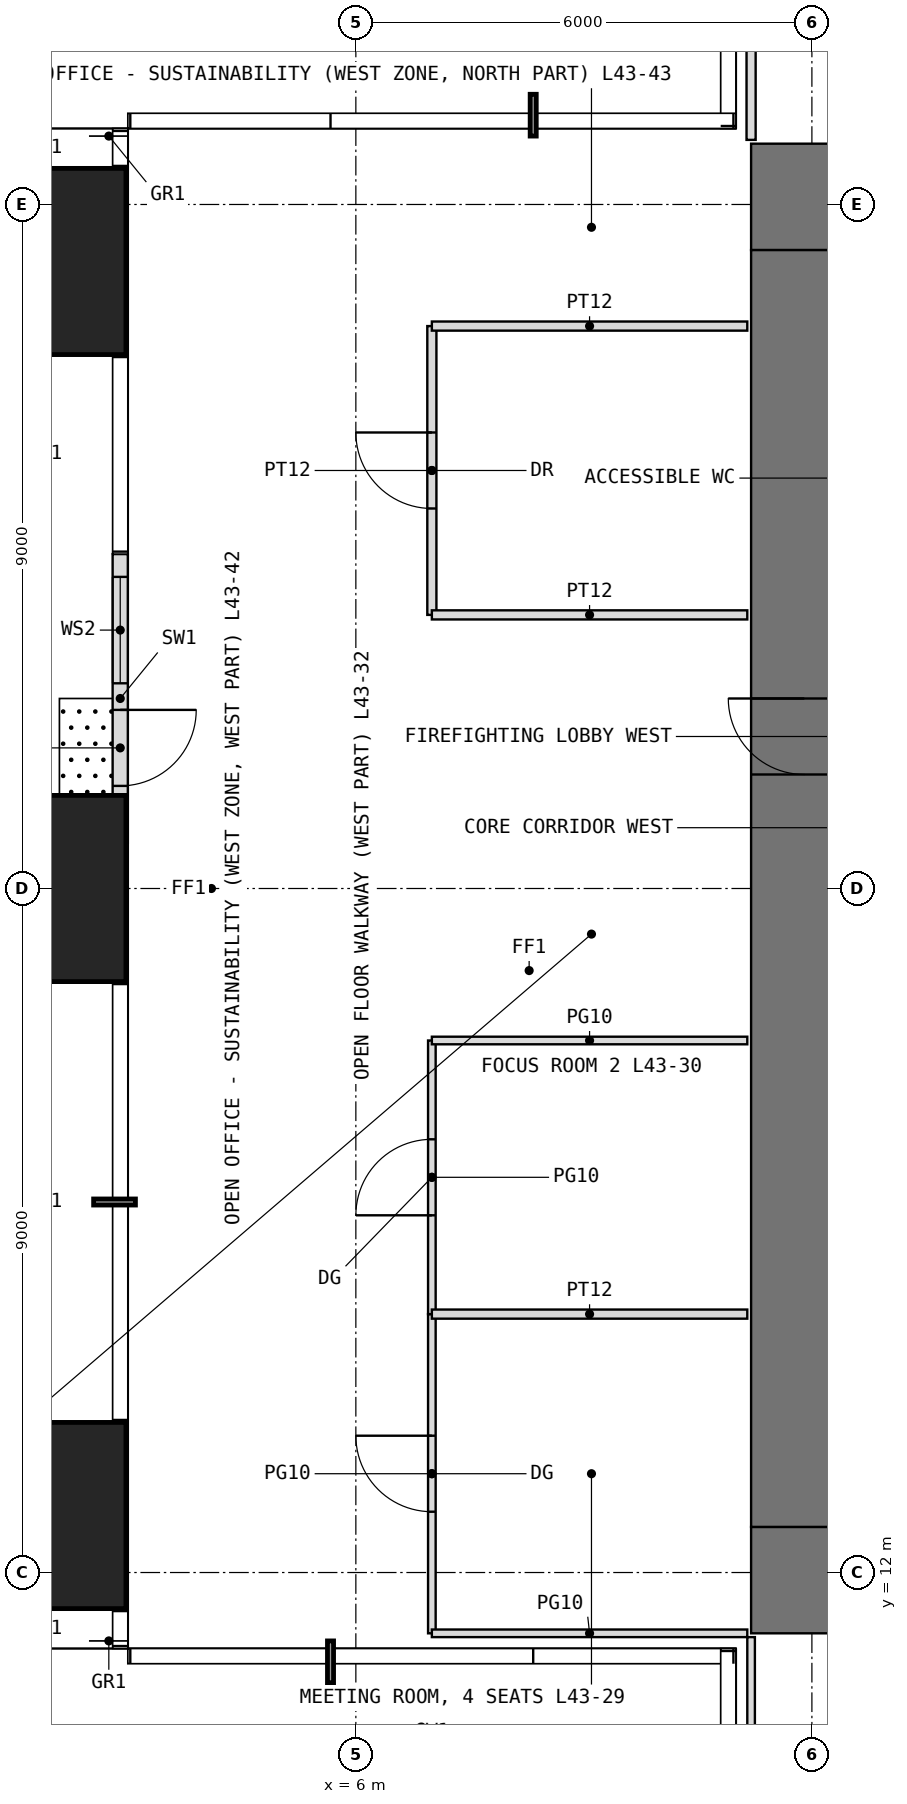
"""IFC4 building model, lengths in metres.
Left out: names, types, materials, properties, quantities, classifications, styles, units other than length and angle.
Written with IfcOpenShell. Run it as: python <this file> out.ifc"""

import sys

from ifc_helpers import new_model, si_unit, direction, frame, frame_2d, origin, origin_2d, place, context, subcontext, project, spatial, rectangle, extrude, element, fill, save


model = new_model("IFC4")
c1 = context("Model", 3, precision=1e-05, world=origin(), true_north=direction((0.0, 1.0)))
c2 = subcontext(c1, "Body", "Model", "MODEL_VIEW")
j1 = project(units=[si_unit("LENGTHUNIT", "METRE"), si_unit("PLANEANGLEUNIT", "RADIAN")], contexts=[c1])
p1 = place(None, origin())
s1 = spatial("IfcSite", under=j1, at=p1, CompositionType="ELEMENT")
p2 = place(p1, origin())
s2 = spatial("IfcBuilding", under=s1, at=p2, CompositionType="ELEMENT")
p3 = place(p2, frame((0.0, 0.0, 182.5)))
s3 = spatial("IfcBuildingStorey", under=s2, at=p3, CompositionType="ELEMENT", Elevation=182.5)
for number, where, z_axis, x_axis in (
    (1, (1.75, 12.75, 0.0), (0.0, 0.0, 1.0), (1.0, 0.0, 0.0)),
    (2, (1.75, 21.0, 0.0), (0.0, 0.0, 1.0), (1.0, 0.0, 0.0)),
    (3, (1.75, 29.25, 0.0), (0.0, 0.0, 1.0), (1.0, 0.0, 0.0)),
):
    element("IfcColumn", number, at=place(p3, frame(where, z_axis=z_axis, x_axis=x_axis)), inside=s3, PredefinedType="COLUMN", context=c2, shape_type="SweptSolid", body=[
        extrude(rectangle(XDim=2.45, YDim=2.45, at=origin_2d()), origin(), (0.0, 0.0, 1.0), 4.0),
    ])
p4 = place(p3, frame((2.9, 25.4, 0.0), z_axis=(0.0, 0.0, 1.0), x_axis=(0.0, -1.0, 0.0)))
e4 = element("IfcWall", 4, at=p4, inside=s3, PredefinedType="USERDEFINED", context=c2, shape_type="SweptSolid", body=[
    extrude(rectangle(XDim=3.8, YDim=0.2, at=frame_2d((1.9, 0.0))), origin(), (0.0, 0.0, 1.0), 3.75),
])
p5 = place(p4, frame((2.05, 0.0, 0.0)))
e5 = element("IfcOpeningElement", 5, at=p5, cuts=e4, PredefinedType="OPENING", context=c2, shape_type="SweptSolid", body=[
    extrude(rectangle(XDim=1.0, YDim=2.4, at=frame_2d((0.5, 1.2))), frame((0.0, 0.11, 0.0), z_axis=(0.0, -1.0, 0.0), x_axis=(1.0, 0.0, 0.0)), (0.0, 0.0, 1.0), 0.22),
])
p6 = place(p4, frame((0.3, 0.0, 0.3)))
e6 = element("IfcOpeningElement", 6, at=p6, cuts=e4, PredefinedType="OPENING", context=c2, shape_type="SweptSolid", body=[
    extrude(rectangle(XDim=1.4, YDim=2.7, at=frame_2d((0.7, 1.35))), frame((0.0, 0.11, 0.0), z_axis=(0.0, -1.0, 0.0), x_axis=(1.0, 0.0, 0.0)), (0.0, 0.0, 1.0), 0.22),
])
p7 = place(p3, frame((11.2, 11.9, -0.05), z_axis=(0.0, 0.0, 1.0), x_axis=(1.0, 0.0, 0.0)))
e7 = element("IfcWall", 7, at=p7, inside=s3, PredefinedType="SHEAR", context=c2, shape_type="SweptSolid", body=[
    extrude(rectangle(XDim=19.6, YDim=1.4, at=frame_2d((9.8, 0.0))), origin(), (0.0, 0.0, 1.0), 4.0),
])
p8 = place(p7, frame((8.8, 0.0, 0.05)))
e8 = element("IfcOpeningElement", 8, at=p8, cuts=e7, PredefinedType="OPENING", context=c2, shape_type="SweptSolid", body=[
    extrude(rectangle(XDim=2.0, YDim=2.2, at=frame_2d((1.0, 1.1))), frame((0.0, 0.71, 0.0), z_axis=(0.0, -1.0, 0.0), x_axis=(1.0, 0.0, 0.0)), (0.0, 0.0, 1.0), 1.42),
])
p9 = place(p3, frame((11.2, 30.1, -0.05), z_axis=(0.0, 0.0, 1.0), x_axis=(1.0, 0.0, 0.0)))
e9 = element("IfcWall", 9, at=p9, inside=s3, PredefinedType="SHEAR", context=c2, shape_type="SweptSolid", body=[
    extrude(rectangle(XDim=19.6, YDim=1.4, at=frame_2d((9.8, 0.0))), origin(), (0.0, 0.0, 1.0), 4.0),
])
p10 = place(p9, frame((8.8, 0.0, 0.05)))
e10 = element("IfcOpeningElement", 10, at=p10, cuts=e9, PredefinedType="OPENING", context=c2, shape_type="SweptSolid", body=[
    extrude(rectangle(XDim=2.0, YDim=2.2, at=frame_2d((1.0, 1.1))), frame((0.0, 0.71, 0.0), z_axis=(0.0, -1.0, 0.0), x_axis=(1.0, 0.0, 0.0)), (0.0, 0.0, 1.0), 1.42),
])
p11 = place(p3, frame((11.9, 12.6, -0.05), z_axis=(0.0, 0.0, 1.0), x_axis=(0.0, 1.0, 0.0)))
e11 = element("IfcWall", 11, at=p11, inside=s3, PredefinedType="SHEAR", context=c2, shape_type="SweptSolid", body=[
    extrude(rectangle(XDim=16.8, YDim=1.4, at=frame_2d((8.4, 0.0))), origin(), (0.0, 0.0, 1.0), 4.0),
])
p12 = place(p11, frame((9.9, 0.0, 0.05)))
e12 = element("IfcOpeningElement", 12, at=p12, cuts=e11, PredefinedType="OPENING", context=c2, shape_type="SweptSolid", body=[
    extrude(rectangle(XDim=1.0, YDim=2.2, at=frame_2d((0.5, 1.1))), frame((0.0, 0.71, 0.0), z_axis=(0.0, -1.0, 0.0), x_axis=(1.0, 0.0, 0.0)), (0.0, 0.0, 1.0), 1.42),
])
p13 = place(p3, frame((7.0, 11.2, 0.0), z_axis=(0.0, 0.0, 1.0), x_axis=(0.0, 1.0, 0.0)))
e13 = element("IfcWall", 13, at=p13, inside=s3, PredefinedType="PARTITIONING", context=c2, shape_type="SweptSolid", body=[
    extrude(rectangle(XDim=4.2, YDim=0.1, at=frame_2d((2.1, 0.0))), origin(), (0.0, 0.0, 1.0), 3.75),
])
p14 = place(p13, frame((1.6, 0.0, 0.0)))
e14 = element("IfcOpeningElement", 14, at=p14, cuts=e13, PredefinedType="OPENING", context=c2, shape_type="SweptSolid", body=[
    extrude(rectangle(XDim=1.0, YDim=2.4, at=frame_2d((0.5, 1.2))), frame((0.0, 0.06, 0.0), z_axis=(0.0, -1.0, 0.0), x_axis=(1.0, 0.0, 0.0)), (0.0, 0.0, 1.0), 0.12),
])
p15 = place(p3, frame((7.0, 11.2, 0.0), z_axis=(0.0, 0.0, 1.0), x_axis=(1.0, 0.0, 0.0)))
e15 = element("IfcWall", 15, at=p15, inside=s3, PredefinedType="PARTITIONING", context=c2, shape_type="SweptSolid", body=[
    extrude(rectangle(XDim=4.15, YDim=0.1, at=frame_2d((2.075, 0.0))), origin(), (0.0, 0.0, 1.0), 3.75),
])
p16 = place(p3, frame((7.0, 15.4, 0.0), z_axis=(0.0, 0.0, 1.0), x_axis=(0.0, 1.0, 0.0)))
e16 = element("IfcWall", 16, at=p16, inside=s3, PredefinedType="PARTITIONING", context=c2, shape_type="SweptSolid", body=[
    extrude(rectangle(XDim=3.6, YDim=0.1, at=frame_2d((1.8, 0.0))), origin(), (0.0, 0.0, 1.0), 3.75),
])
p17 = place(p16, frame((1.3, 0.0, 0.0)))
e17 = element("IfcOpeningElement", 17, at=p17, cuts=e16, PredefinedType="OPENING", context=c2, shape_type="SweptSolid", body=[
    extrude(rectangle(XDim=1.0, YDim=2.4, at=frame_2d((0.5, 1.2))), frame((0.0, 0.06, 0.0), z_axis=(0.0, -1.0, 0.0), x_axis=(1.0, 0.0, 0.0)), (0.0, 0.0, 1.0), 0.12),
])
p18 = place(p3, frame((7.0, 15.4, 0.0), z_axis=(0.0, 0.0, 1.0), x_axis=(1.0, 0.0, 0.0)))
e18 = element("IfcWall", 18, at=p18, inside=s3, PredefinedType="PARTITIONING", context=c2, shape_type="SweptSolid", body=[
    extrude(rectangle(XDim=4.15, YDim=0.12, at=frame_2d((2.075, 0.0))), origin(), (0.0, 0.0, 1.0), 3.75),
])
p19 = place(p3, frame((7.0, 19.0, 0.0), z_axis=(0.0, 0.0, 1.0), x_axis=(1.0, 0.0, 0.0)))
e19 = element("IfcWall", 19, at=p19, inside=s3, PredefinedType="PARTITIONING", context=c2, shape_type="SweptSolid", body=[
    extrude(rectangle(XDim=4.15, YDim=0.1, at=frame_2d((2.075, 0.0))), origin(), (0.0, 0.0, 1.0), 3.75),
])
p20 = place(p3, frame((7.0, 24.6, 0.0), z_axis=(0.0, 0.0, 1.0), x_axis=(0.0, 1.0, 0.0)))
e20 = element("IfcWall", 20, at=p20, inside=s3, PredefinedType="PARTITIONING", context=c2, shape_type="SweptSolid", body=[
    extrude(rectangle(XDim=3.8, YDim=0.12, at=frame_2d((1.9, 0.0))), origin(), (0.0, 0.0, 1.0), 3.75),
])
p21 = place(p20, frame((1.4, 0.0, 0.0)))
e21 = element("IfcOpeningElement", 21, at=p21, cuts=e20, PredefinedType="OPENING", context=c2, shape_type="SweptSolid", body=[
    extrude(rectangle(XDim=1.0, YDim=2.2, at=frame_2d((0.5, 1.1))), frame((0.0, 0.07, 0.0), z_axis=(0.0, -1.0, 0.0), x_axis=(1.0, 0.0, 0.0)), (0.0, 0.0, 1.0), 0.14),
])
for number, where, z_axis, x_axis in (
    (22, (7.0, 24.6, 0.0), (0.0, 0.0, 1.0), (1.0, 0.0, 0.0)),
    (23, (7.0, 28.4, 0.0), (0.0, 0.0, 1.0), (1.0, 0.0, 0.0)),
):
    element("IfcWall", number, at=place(p3, frame(where, z_axis=z_axis, x_axis=x_axis)), inside=s3, PredefinedType="PARTITIONING", context=c2, shape_type="SweptSolid", body=[
        extrude(rectangle(XDim=4.15, YDim=0.12, at=frame_2d((2.075, 0.0))), origin(), (0.0, 0.0, 1.0), 3.75),
    ])
p22 = place(p3, frame((11.2, 6.2, 0.0), z_axis=(0.0, 0.0, 1.0), x_axis=(0.0, 1.0, 0.0)))
e24 = element("IfcWall", 24, at=p22, inside=s3, PredefinedType="PARTITIONING", context=c2, shape_type="SweptSolid", body=[
    extrude(rectangle(XDim=4.95, YDim=0.1, at=frame_2d((2.475, 0.0))), origin(), (0.0, 0.0, 1.0), 3.75),
])
p23 = place(p3, frame((11.2, 30.85, 0.0), z_axis=(0.0, 0.0, 1.0), x_axis=(0.0, 1.0, 0.0)))
e25 = element("IfcWall", 25, at=p23, inside=s3, PredefinedType="PARTITIONING", context=c2, shape_type="SweptSolid", body=[
    extrude(rectangle(XDim=2.65, YDim=0.12, at=frame_2d((1.325, 0.0))), origin(), (0.0, 0.0, 1.0), 3.75),
])
p24 = place(p5, origin())
e26 = element("IfcDoor", 26, at=p24, inside=s3, OperationType="SINGLE_SWING_LEFT", PredefinedType="DOOR", context=c2, shape_type="SweptSolid", body=[
    extrude(rectangle(XDim=1.0, YDim=2.4, at=frame_2d((0.5, 1.2))), frame((0.0, 0.025, 0.0), z_axis=(0.0, -1.0, 0.0), x_axis=(1.0, 0.0, 0.0)), (0.0, 0.0, 1.0), 0.05),
])
fill(e5, e26)
p25 = place(p6, origin())
e27 = element("IfcWindow", 27, at=p25, inside=s3, PartitioningType="SINGLE_PANEL", PredefinedType="WINDOW", context=c2, shape_type="SweptSolid", body=[
    extrude(rectangle(XDim=1.4, YDim=2.7, at=frame_2d((0.7, 1.35))), frame((0.0, 0.03, 0.0), z_axis=(0.0, -1.0, 0.0), x_axis=(1.0, 0.0, 0.0)), (0.0, 0.0, 1.0), 0.06),
])
fill(e6, e27)
p26 = place(p12, origin())
e28 = element("IfcDoor", 28, at=p26, inside=s3, OperationType="SINGLE_SWING_RIGHT", PredefinedType="DOOR", context=c2, shape_type="SweptSolid", body=[
    extrude(rectangle(XDim=1.0, YDim=2.2, at=frame_2d((0.5, 1.1))), frame((0.0, 0.025, 0.0), z_axis=(0.0, -1.0, 0.0), x_axis=(1.0, 0.0, 0.0)), (0.0, 0.0, 1.0), 0.05),
])
fill(e12, e28)
p27 = place(p14, origin())
e29 = element("IfcDoor", 29, at=p27, inside=s3, OperationType="SINGLE_SWING_RIGHT", PredefinedType="DOOR", context=c2, shape_type="SweptSolid", body=[
    extrude(rectangle(XDim=1.0, YDim=2.4, at=frame_2d((0.5, 1.2))), frame((0.0, 0.025, 0.0), z_axis=(0.0, -1.0, 0.0), x_axis=(1.0, 0.0, 0.0)), (0.0, 0.0, 1.0), 0.05),
])
fill(e14, e29)
p28 = place(p17, origin())
e30 = element("IfcDoor", 30, at=p28, inside=s3, OperationType="SINGLE_SWING_LEFT", PredefinedType="DOOR", context=c2, shape_type="SweptSolid", body=[
    extrude(rectangle(XDim=1.0, YDim=2.4, at=frame_2d((0.5, 1.2))), frame((0.0, 0.025, 0.0), z_axis=(0.0, -1.0, 0.0), x_axis=(1.0, 0.0, 0.0)), (0.0, 0.0, 1.0), 0.05),
])
fill(e17, e30)
p29 = place(p21, origin())
e31 = element("IfcDoor", 31, at=p29, inside=s3, OperationType="SINGLE_SWING_RIGHT", PredefinedType="DOOR", context=c2, shape_type="SweptSolid", body=[
    extrude(rectangle(XDim=1.0, YDim=2.2, at=frame_2d((0.5, 1.1))), frame((0.0, 0.025, 0.0), z_axis=(0.0, -1.0, 0.0), x_axis=(1.0, 0.0, 0.0)), (0.0, 0.0, 1.0), 0.05),
])
fill(e21, e31)
save(model, sys.argv[1])
